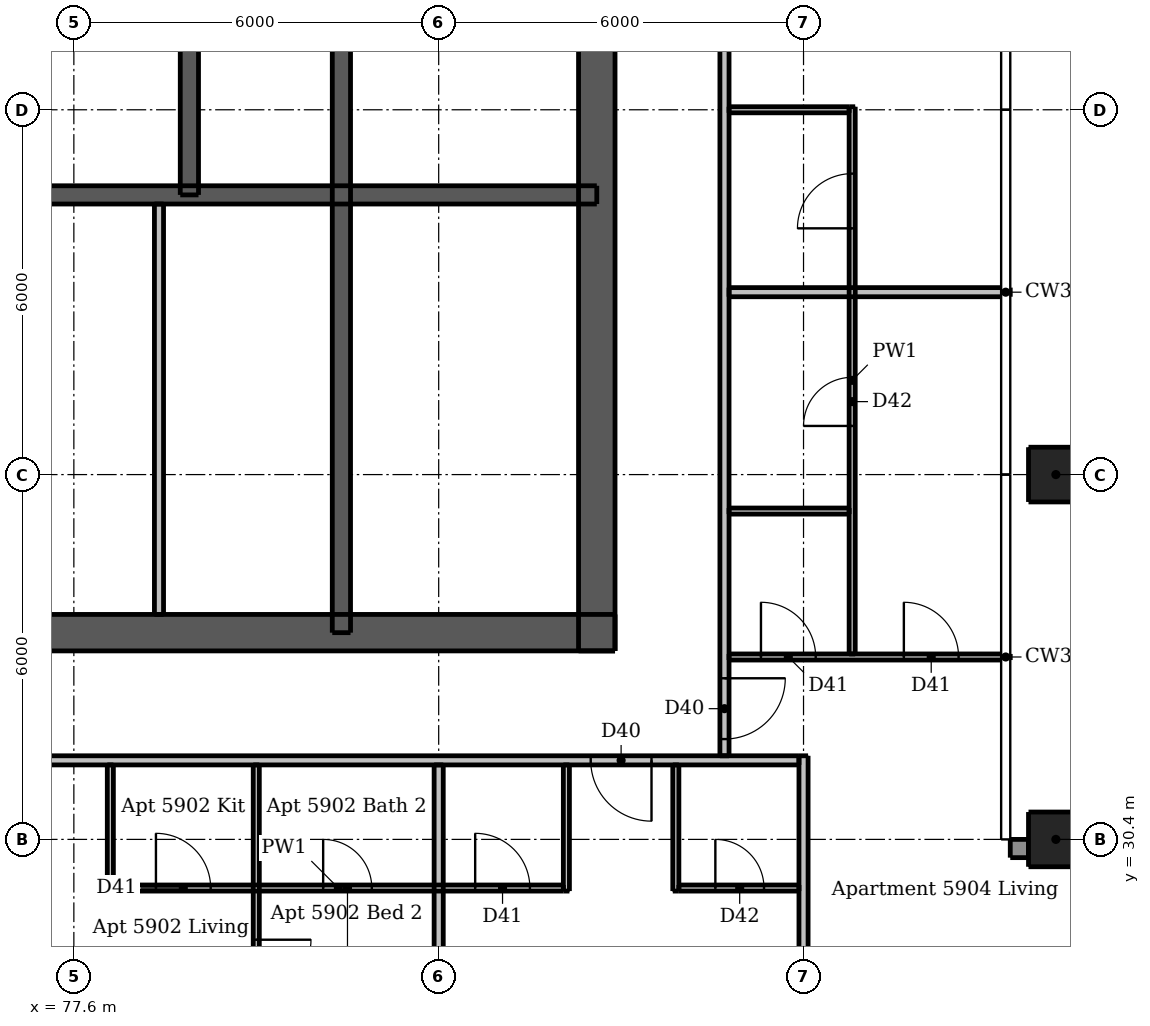
"""IFC4 building model, lengths in metres.
Left out: names, types, materials, properties, quantities, classifications, styles, units other than length and angle.
Written with IfcOpenShell. Run it as: python <this file> out.ifc"""

import sys

from ifc_helpers import new_model, si_unit, direction, frame, frame_2d, origin, origin_2d, place, context, subcontext, project, spatial, rectangle, extrude, element, fill, save


model = new_model("IFC4")
c1 = context("Model", 3, precision=1e-05, world=origin(), true_north=direction((0.0, 1.0)))
c2 = subcontext(c1, "Body", "Model", "MODEL_VIEW")
j1 = project(units=[si_unit("LENGTHUNIT", "METRE"), si_unit("PLANEANGLEUNIT", "RADIAN")], contexts=[c1])
p1 = place(None, origin())
s1 = spatial("IfcSite", under=j1, at=p1, CompositionType="ELEMENT")
p2 = place(p1, origin())
s2 = spatial("IfcBuilding", under=s1, at=p2, CompositionType="ELEMENT")
p3 = place(p2, frame((0.0, 0.0, 220.0)))
s3 = spatial("IfcBuildingStorey", under=s2, at=p3, CompositionType="ELEMENT", Elevation=220.0)
p4 = place(p3, frame((62.5, 33.8, 0.0), z_axis=(0.0, 0.0, 1.0), x_axis=(1.0, 0.0, 0.0)))
e1 = element("IfcWall", 1, at=p4, inside=s3, PredefinedType="SHEAR", context=c2, shape_type="SweptSolid", body=[
    extrude(rectangle(XDim=24.0, YDim=0.6, at=frame_2d((12.0, 0.0))), origin(), (0.0, 0.0, 1.0), 3.05),
])
p5 = place(p4, frame((1.925, 0.0, 0.0)))
e2 = element("IfcOpeningElement", 2, at=p5, cuts=e1, PredefinedType="OPENING", context=c2, shape_type="SweptSolid", body=[
    extrude(rectangle(XDim=1.1, YDim=2.1, at=frame_2d((0.55, 1.05))), frame((0.0, 0.31, 0.0), z_axis=(0.0, -1.0, 0.0), x_axis=(1.0, 0.0, 0.0)), (0.0, 0.0, 1.0), 0.62),
])
p6 = place(p4, frame((20.975, 0.0, 0.0)))
e3 = element("IfcOpeningElement", 3, at=p6, cuts=e1, PredefinedType="OPENING", context=c2, shape_type="SweptSolid", body=[
    extrude(rectangle(XDim=1.1, YDim=2.1, at=frame_2d((0.55, 1.05))), frame((0.0, 0.31, 0.0), z_axis=(0.0, -1.0, 0.0), x_axis=(1.0, 0.0, 0.0)), (0.0, 0.0, 1.0), 0.62),
])
p7 = place(p4, frame((8.0, 0.0, 0.0)))
e4 = element("IfcOpeningElement", 4, at=p7, cuts=e1, PredefinedType="OPENING", context=c2, shape_type="SweptSolid", body=[
    extrude(rectangle(XDim=1.1, YDim=2.1, at=frame_2d((0.55, 1.05))), frame((0.0, 0.31, 0.0), z_axis=(0.0, -1.0, 0.0), x_axis=(1.0, 0.0, 0.0)), (0.0, 0.0, 1.0), 0.62),
])
p8 = place(p4, frame((17.512, 0.0, 0.0)))
e5 = element("IfcOpeningElement", 5, at=p8, cuts=e1, PredefinedType="OPENING", context=c2, shape_type="SweptSolid", body=[
    extrude(rectangle(XDim=0.9, YDim=2.1, at=frame_2d((0.45, 1.05))), frame((0.0, 0.31, 0.0), z_axis=(0.0, -1.0, 0.0), x_axis=(1.0, 0.0, 0.0)), (0.0, 0.0, 1.0), 0.62),
])
p9 = place(p3, frame((86.2, 33.5, 0.0), z_axis=(0.0, 0.0, 1.0), x_axis=(0.0, 1.0, 0.0)))
e6 = element("IfcWall", 6, at=p9, inside=s3, PredefinedType="SHEAR", context=c2, shape_type="SweptSolid", body=[
    extrude(rectangle(XDim=24.0, YDim=0.6, at=frame_2d((12.0, 0.0))), origin(), (0.0, 0.0, 1.0), 3.05),
])
p10 = place(p9, frame((11.2, 0.0, 0.0)))
e7 = element("IfcOpeningElement", 7, at=p10, cuts=e6, PredefinedType="OPENING", context=c2, shape_type="SweptSolid", body=[
    extrude(rectangle(XDim=1.6, YDim=2.1, at=frame_2d((0.8, 1.05))), frame((0.0, 0.31, 0.0), z_axis=(0.0, -1.0, 0.0), x_axis=(1.0, 0.0, 0.0)), (0.0, 0.0, 1.0), 0.62),
])
p11 = place(p3, frame((62.8, 41.0, 0.0), z_axis=(0.0, 0.0, 1.0), x_axis=(1.0, 0.0, 0.0)))
e8 = element("IfcWall", 8, at=p11, inside=s3, PredefinedType="SHEAR", context=c2, shape_type="SweptSolid", body=[
    extrude(rectangle(XDim=23.4, YDim=0.3, at=frame_2d((11.7, 0.0))), origin(), (0.0, 0.0, 1.0), 3.05),
])
p12 = place(p3, frame((82.0, 33.8, 0.0), z_axis=(0.0, 0.0, 1.0), x_axis=(0.0, 1.0, 0.0)))
e9 = element("IfcWall", 9, at=p12, inside=s3, PredefinedType="SHEAR", context=c2, shape_type="SweptSolid", body=[
    extrude(rectangle(XDim=10.1, YDim=0.3, at=frame_2d((5.05, 0.0))), origin(), (0.0, 0.0, 1.0), 3.05),
])
p13 = place(p3, frame((79.5, 41.0, 0.0), z_axis=(0.0, 0.0, 1.0), x_axis=(0.0, 1.0, 0.0)))
e10 = element("IfcWall", 10, at=p13, inside=s3, PredefinedType="SHEAR", context=c2, shape_type="SweptSolid", body=[
    extrude(rectangle(XDim=2.9, YDim=0.3, at=frame_2d((1.45, 0.0))), origin(), (0.0, 0.0, 1.0), 3.05),
])
for number, where, z_axis, x_axis in (
    (11, (93.75, 30.4, 0.0), (0.0, 0.0, 1.0), (1.0, 0.0, 0.0)),
    (12, (93.75, 36.4, 0.0), (0.0, 0.0, 1.0), (1.0, 0.0, 0.0)),
):
    element("IfcColumn", number, at=place(p3, frame(where, z_axis=z_axis, x_axis=x_axis)), inside=s3, PredefinedType="COLUMN", context=c2, shape_type="SweptSolid", body=[
        extrude(rectangle(XDim=0.9, YDim=0.9, at=origin_2d()), origin(), (0.0, 0.0, 1.0), 3.05),
    ])
p14 = place(p3, frame((93.3, 30.25, 0.0), z_axis=(0.0, 0.0, 1.0), x_axis=(-1.0, 0.0, 0.0)))
e13 = element("IfcWall", 13, at=p14, inside=s3, PredefinedType="SOLIDWALL", context=c2, shape_type="SweptSolid", body=[
    extrude(rectangle(XDim=0.3, YDim=0.3, at=frame_2d((0.15, 0.0))), origin(), (0.0, 0.0, 1.0), 3.05),
])
p15 = place(p3, frame((79.0, 34.1, 0.0), z_axis=(0.0, 0.0, 1.0), x_axis=(0.0, 1.0, 0.0)))
e14 = element("IfcWall", 14, at=p15, inside=s3, PredefinedType="PLUMBINGWALL", context=c2, shape_type="SweptSolid", body=[
    extrude(rectangle(XDim=6.75, YDim=0.15, at=frame_2d((3.375, 0.0))), origin(), (0.0, 0.0, 1.0), 3.05),
])
p16 = place(p3, frame((78.2, 29.55, 0.0), z_axis=(0.0, 0.0, 1.0), x_axis=(0.0, 1.0, 0.0)))
e15 = element("IfcWall", 15, at=p16, inside=s3, PredefinedType="PARTITIONING", context=c2, shape_type="SweptSolid", body=[
    extrude(rectangle(XDim=2.075, YDim=0.1, at=frame_2d((1.038, 0.0))), origin(), (0.0, 0.0, 1.0), 3.05),
])
p17 = place(p3, frame((80.6, 31.625, 0.0), z_axis=(0.0, 0.0, 1.0), x_axis=(0.0, -1.0, 0.0)))
e16 = element("IfcWall", 16, at=p17, inside=s3, PredefinedType="PARTITIONING", context=c2, shape_type="SweptSolid", body=[
    extrude(rectangle(XDim=4.625, YDim=0.1, at=frame_2d((2.312, 0.0))), origin(), (0.0, 0.0, 1.0), 3.05),
])
p18 = place(p17, frame((2.875, 0.0, 0.0)))
e17 = element("IfcOpeningElement", 17, at=p18, cuts=e16, PredefinedType="OPENING", context=c2, shape_type="SweptSolid", body=[
    extrude(rectangle(XDim=0.9, YDim=2.1, at=frame_2d((0.45, 1.05))), frame((0.0, 0.06, 0.0), z_axis=(0.0, -1.0, 0.0), x_axis=(1.0, 0.0, 0.0)), (0.0, 0.0, 1.0), 0.12),
])
for number, where, z_axis, x_axis in (
    (18, (85.7, 29.55, 0.0), (0.0, 0.0, 1.0), (0.0, 1.0, 0.0)),
    (19, (87.5, 29.55, 0.0), (0.0, 0.0, 1.0), (0.0, 1.0, 0.0)),
):
    element("IfcWall", number, at=place(p3, frame(where, z_axis=z_axis, x_axis=x_axis)), inside=s3, PredefinedType="PARTITIONING", context=c2, shape_type="SweptSolid", body=[
        extrude(rectangle(XDim=2.075, YDim=0.1, at=frame_2d((1.038, 0.0))), origin(), (0.0, 0.0, 1.0), 3.05),
    ])
p19 = place(p3, frame((90.4, 33.45, 0.0), z_axis=(0.0, 0.0, 1.0), x_axis=(0.0, 1.0, 0.0)))
e20 = element("IfcWall", 20, at=p19, inside=s3, PredefinedType="PARTITIONING", context=c2, shape_type="SweptSolid", body=[
    extrude(rectangle(XDim=9.0, YDim=0.1, at=frame_2d((4.5, 0.0))), origin(), (0.0, 0.0, 1.0), 3.05),
])
p20 = place(p19, frame((3.75, 0.0, 0.0)))
e21 = element("IfcOpeningElement", 21, at=p20, cuts=e20, PredefinedType="OPENING", context=c2, shape_type="SweptSolid", body=[
    extrude(rectangle(XDim=0.8, YDim=2.1, at=frame_2d((0.4, 1.05))), frame((0.0, 0.06, 0.0), z_axis=(0.0, -1.0, 0.0), x_axis=(1.0, 0.0, 0.0)), (0.0, 0.0, 1.0), 0.12),
])
p21 = place(p19, frame((7.0, 0.0, 0.0)))
e22 = element("IfcOpeningElement", 22, at=p21, cuts=e20, PredefinedType="OPENING", context=c2, shape_type="SweptSolid", body=[
    extrude(rectangle(XDim=0.9, YDim=2.1, at=frame_2d((0.45, 1.05))), frame((0.0, 0.06, 0.0), z_axis=(0.0, -1.0, 0.0), x_axis=(1.0, 0.0, 0.0)), (0.0, 0.0, 1.0), 0.12),
])
p22 = place(p3, frame((88.375, 42.4, 0.0), z_axis=(0.0, 0.0, 1.0), x_axis=(1.0, 0.0, 0.0)))
e23 = element("IfcWall", 23, at=p22, inside=s3, PredefinedType="PARTITIONING", context=c2, shape_type="SweptSolid", body=[
    extrude(rectangle(XDim=1.975, YDim=0.1, at=frame_2d((0.988, 0.0))), origin(), (0.0, 0.0, 1.0), 2.59),
])
p23 = place(p3, frame((88.375, 35.8, 0.0), z_axis=(0.0, 0.0, 1.0), x_axis=(1.0, 0.0, 0.0)))
e24 = element("IfcWall", 24, at=p23, inside=s3, PredefinedType="PARTITIONING", context=c2, shape_type="SweptSolid", body=[
    extrude(rectangle(XDim=1.975, YDim=0.1, at=frame_2d((0.988, 0.0))), origin(), (0.0, 0.0, 1.0), 3.05),
])
p24 = place(p3, frame((88.375, 33.4, 0.0), z_axis=(0.0, 0.0, 1.0), x_axis=(1.0, 0.0, 0.0)))
e25 = element("IfcWall", 25, at=p24, inside=s3, PredefinedType="PARTITIONING", context=c2, shape_type="SweptSolid", body=[
    extrude(rectangle(XDim=4.625, YDim=0.1, at=frame_2d((2.312, 0.0))), origin(), (0.0, 0.0, 1.0), 3.05),
])
p25 = place(p24, frame((0.525, 0.0, 0.0)))
e26 = element("IfcOpeningElement", 26, at=p25, cuts=e25, PredefinedType="OPENING", context=c2, shape_type="SweptSolid", body=[
    extrude(rectangle(XDim=0.9, YDim=2.1, at=frame_2d((0.45, 1.05))), frame((0.0, 0.06, 0.0), z_axis=(0.0, -1.0, 0.0), x_axis=(1.0, 0.0, 0.0)), (0.0, 0.0, 1.0), 0.12),
])
p26 = place(p24, frame((2.875, 0.0, 0.0)))
e27 = element("IfcOpeningElement", 27, at=p26, cuts=e25, PredefinedType="OPENING", context=c2, shape_type="SweptSolid", body=[
    extrude(rectangle(XDim=0.9, YDim=2.1, at=frame_2d((0.45, 1.05))), frame((0.0, 0.06, 0.0), z_axis=(0.0, -1.0, 0.0), x_axis=(1.0, 0.0, 0.0)), (0.0, 0.0, 1.0), 0.12),
])
p27 = place(p3, frame((78.25, 29.6, 0.0), z_axis=(0.0, 0.0, 1.0), x_axis=(1.0, 0.0, 0.0)))
e28 = element("IfcWall", 28, at=p27, inside=s3, PredefinedType="PARTITIONING", context=c2, shape_type="SweptSolid", body=[
    extrude(rectangle(XDim=7.4, YDim=0.1, at=frame_2d((3.7, 0.0))), origin(), (0.0, 0.0, 1.0), 3.05),
])
p28 = place(p27, frame((0.7, 0.0, 0.0)))
e29 = element("IfcOpeningElement", 29, at=p28, cuts=e28, PredefinedType="OPENING", context=c2, shape_type="SweptSolid", body=[
    extrude(rectangle(XDim=0.9, YDim=2.1, at=frame_2d((0.45, 1.05))), frame((0.0, 0.06, 0.0), z_axis=(0.0, -1.0, 0.0), x_axis=(1.0, 0.0, 0.0)), (0.0, 0.0, 1.0), 0.12),
])
p29 = place(p27, frame((3.45, 0.0, 0.0)))
e30 = element("IfcOpeningElement", 30, at=p29, cuts=e28, PredefinedType="OPENING", context=c2, shape_type="SweptSolid", body=[
    extrude(rectangle(XDim=0.8, YDim=2.1, at=frame_2d((0.4, 1.05))), frame((0.0, 0.06, 0.0), z_axis=(0.0, -1.0, 0.0), x_axis=(1.0, 0.0, 0.0)), (0.0, 0.0, 1.0), 0.12),
])
p30 = place(p27, frame((5.95, 0.0, 0.0)))
e31 = element("IfcOpeningElement", 31, at=p30, cuts=e28, PredefinedType="OPENING", context=c2, shape_type="SweptSolid", body=[
    extrude(rectangle(XDim=0.9, YDim=2.1, at=frame_2d((0.45, 1.05))), frame((0.0, 0.06, 0.0), z_axis=(0.0, -1.0, 0.0), x_axis=(1.0, 0.0, 0.0)), (0.0, 0.0, 1.0), 0.12),
])
p31 = place(p3, frame((87.55, 29.6, 0.0), z_axis=(0.0, 0.0, 1.0), x_axis=(1.0, 0.0, 0.0)))
e32 = element("IfcWall", 32, at=p31, inside=s3, PredefinedType="PARTITIONING", context=c2, shape_type="SweptSolid", body=[
    extrude(rectangle(XDim=1.975, YDim=0.1, at=frame_2d((0.987, 0.0))), origin(), (0.0, 0.0, 1.0), 3.05),
])
p32 = place(p31, frame((0.6, 0.0, 0.0)))
e33 = element("IfcOpeningElement", 33, at=p32, cuts=e32, PredefinedType="OPENING", context=c2, shape_type="SweptSolid", body=[
    extrude(rectangle(XDim=0.8, YDim=2.1, at=frame_2d((0.4, 1.05))), frame((0.0, 0.06, 0.0), z_axis=(0.0, -1.0, 0.0), x_axis=(1.0, 0.0, 0.0)), (0.0, 0.0, 1.0), 0.12),
])
p33 = place(p3, frame((83.6, 27.0, 0.0), z_axis=(0.0, 0.0, 1.0), x_axis=(0.0, 1.0, 0.0)))
e34 = element("IfcWall", 34, at=p33, inside=s3, PredefinedType="PARTITIONING", context=c2, shape_type="SweptSolid", body=[
    extrude(rectangle(XDim=4.625, YDim=0.15, at=frame_2d((2.312, 0.0))), origin(), (0.0, 0.0, 1.0), 2.59),
])
p34 = place(p3, frame((88.3, 61.175, 0.0), z_axis=(0.0, 0.0, 1.0), x_axis=(0.0, -1.0, 0.0)))
e35 = element("IfcWall", 35, at=p34, inside=s3, PredefinedType="PARTITIONING", context=c2, shape_type="SweptSolid", body=[
    extrude(rectangle(XDim=29.4, YDim=0.15, at=frame_2d((14.7, 0.0))), origin(), (0.0, 0.0, 1.0), 3.05),
])
p35 = place(p34, frame((28.125, 0.0, 0.0)))
e36 = element("IfcOpeningElement", 36, at=p35, cuts=e35, PredefinedType="OPENING", context=c2, shape_type="SweptSolid", body=[
    extrude(rectangle(XDim=1.0, YDim=2.1, at=frame_2d((0.5, 1.05))), frame((0.0, 0.085, 0.0), z_axis=(0.0, -1.0, 0.0), x_axis=(1.0, 0.0, 0.0)), (0.0, 0.0, 1.0), 0.17),
])
p36 = place(p34, frame((15.275, 0.0, 0.0)))
e37 = element("IfcOpeningElement", 37, at=p36, cuts=e35, PredefinedType="OPENING", context=c2, shape_type="SweptSolid", body=[
    extrude(rectangle(XDim=1.0, YDim=2.1, at=frame_2d((0.5, 1.05))), frame((0.0, 0.085, 0.0), z_axis=(0.0, -1.0, 0.0), x_axis=(1.0, 0.0, 0.0)), (0.0, 0.0, 1.0), 0.17),
])
p37 = place(p34, frame((5.075, 0.0, 0.0)))
e38 = element("IfcOpeningElement", 38, at=p37, cuts=e35, PredefinedType="OPENING", context=c2, shape_type="SweptSolid", body=[
    extrude(rectangle(XDim=1.0, YDim=2.1, at=frame_2d((0.5, 1.05))), frame((0.0, 0.085, 0.0), z_axis=(0.0, -1.0, 0.0), x_axis=(1.0, 0.0, 0.0)), (0.0, 0.0, 1.0), 0.17),
])
p38 = place(p3, frame((89.6, 27.0, 0.0), z_axis=(0.0, 0.0, 1.0), x_axis=(0.0, 1.0, 0.0)))
e39 = element("IfcWall", 39, at=p38, inside=s3, PredefinedType="PARTITIONING", context=c2, shape_type="SweptSolid", body=[
    extrude(rectangle(XDim=4.775, YDim=0.15, at=frame_2d((2.387, 0.0))), origin(), (0.0, 0.0, 1.0), 2.516),
])
p39 = place(p3, frame((88.375, 39.4, 0.0), z_axis=(0.0, 0.0, 1.0), x_axis=(1.0, 0.0, 0.0)))
e40 = element("IfcWall", 40, at=p39, inside=s3, PredefinedType="PARTITIONING", context=c2, shape_type="SweptSolid", body=[
    extrude(rectangle(XDim=4.625, YDim=0.15, at=frame_2d((2.312, 0.0))), origin(), (0.0, 0.0, 1.0), 3.05),
])
p40 = place(p3, frame((89.525, 31.7, 0.0), z_axis=(0.0, 0.0, 1.0), x_axis=(-1.0, 0.0, 0.0)))
e41 = element("IfcWall", 41, at=p40, inside=s3, PredefinedType="PARTITIONING", context=c2, shape_type="SweptSolid", body=[
    extrude(rectangle(XDim=30.55, YDim=0.15, at=frame_2d((15.275, 0.0))), origin(), (0.0, 0.0, 1.0), 3.05),
])
p41 = place(p40, frame((28.275, 0.0, 0.0)))
e42 = element("IfcOpeningElement", 42, at=p41, cuts=e41, PredefinedType="OPENING", context=c2, shape_type="SweptSolid", body=[
    extrude(rectangle(XDim=1.0, YDim=2.1, at=frame_2d((0.5, 1.05))), frame((0.0, 0.085, 0.0), z_axis=(0.0, -1.0, 0.0), x_axis=(1.0, 0.0, 0.0)), (0.0, 0.0, 1.0), 0.17),
])
p42 = place(p40, frame((12.625, 0.0, 0.0)))
e43 = element("IfcOpeningElement", 43, at=p42, cuts=e41, PredefinedType="OPENING", context=c2, shape_type="SweptSolid", body=[
    extrude(rectangle(XDim=1.0, YDim=2.1, at=frame_2d((0.5, 1.05))), frame((0.0, 0.085, 0.0), z_axis=(0.0, -1.0, 0.0), x_axis=(1.0, 0.0, 0.0)), (0.0, 0.0, 1.0), 0.17),
])
p43 = place(p40, frame((2.425, 0.0, 0.0)))
e44 = element("IfcOpeningElement", 44, at=p43, cuts=e41, PredefinedType="OPENING", context=c2, shape_type="SweptSolid", body=[
    extrude(rectangle(XDim=1.0, YDim=2.1, at=frame_2d((0.5, 1.05))), frame((0.0, 0.085, 0.0), z_axis=(0.0, -1.0, 0.0), x_axis=(1.0, 0.0, 0.0)), (0.0, 0.0, 1.0), 0.17),
])
p44 = place(p6, origin())
e45 = element("IfcDoor", 45, at=p44, inside=s3, OperationType="SINGLE_SWING_RIGHT", PredefinedType="DOOR", context=c2, shape_type="SweptSolid", body=[
    extrude(rectangle(XDim=1.1, YDim=2.1, at=frame_2d((0.55, 1.05))), frame((0.0, 0.288, 0.0), z_axis=(0.0, -1.0, 0.0), x_axis=(1.0, 0.0, 0.0)), (0.0, 0.0, 1.0), 0.05),
])
fill(e3, e45)
p45 = place(p8, origin())
e46 = element("IfcDoor", 46, at=p45, inside=s3, OperationType="SINGLE_SWING_LEFT", PredefinedType="DOOR", context=c2, shape_type="SweptSolid", body=[
    extrude(rectangle(XDim=0.9, YDim=2.1, at=frame_2d((0.45, 1.05))), frame((0.0, 0.288, 0.0), z_axis=(0.0, -1.0, 0.0), x_axis=(1.0, 0.0, 0.0)), (0.0, 0.0, 1.0), 0.05),
])
fill(e5, e46)
p46 = place(p28, origin())
e47 = element("IfcDoor", 47, at=p46, inside=s3, OperationType="SINGLE_SWING_LEFT", PredefinedType="DOOR", context=c2, shape_type="SweptSolid", body=[
    extrude(rectangle(XDim=0.9, YDim=2.1, at=frame_2d((0.45, 1.05))), frame((0.0, 0.025, 0.0), z_axis=(0.0, -1.0, 0.0), x_axis=(1.0, 0.0, 0.0)), (0.0, 0.0, 1.0), 0.05),
])
fill(e29, e47)
p47 = place(p18, origin())
e48 = element("IfcDoor", 48, at=p47, inside=s3, OperationType="SINGLE_SWING_LEFT", PredefinedType="DOOR", context=c2, shape_type="SweptSolid", body=[
    extrude(rectangle(XDim=0.9, YDim=2.1, at=frame_2d((0.45, 1.05))), frame((0.0, 0.025, 0.0), z_axis=(0.0, -1.0, 0.0), x_axis=(1.0, 0.0, 0.0)), (0.0, 0.0, 1.0), 0.05),
])
fill(e17, e48)
p48 = place(p29, origin())
e49 = element("IfcDoor", 49, at=p48, inside=s3, OperationType="SINGLE_SWING_LEFT", PredefinedType="DOOR", context=c2, shape_type="SweptSolid", body=[
    extrude(rectangle(XDim=0.8, YDim=2.1, at=frame_2d((0.4, 1.05))), frame((0.0, 0.025, 0.0), z_axis=(0.0, -1.0, 0.0), x_axis=(1.0, 0.0, 0.0)), (0.0, 0.0, 1.0), 0.05),
])
fill(e30, e49)
p49 = place(p43, origin())
e50 = element("IfcDoor", 50, at=p49, inside=s3, OperationType="SINGLE_SWING_LEFT", PredefinedType="DOOR", context=c2, shape_type="SweptSolid", body=[
    extrude(rectangle(XDim=1.0, YDim=2.1, at=frame_2d((0.5, 1.05))), frame((0.0, 0.025, 0.0), z_axis=(0.0, -1.0, 0.0), x_axis=(1.0, 0.0, 0.0)), (0.0, 0.0, 1.0), 0.05),
])
fill(e44, e50)
p50 = place(p30, origin())
e51 = element("IfcDoor", 51, at=p50, inside=s3, OperationType="SINGLE_SWING_LEFT", PredefinedType="DOOR", context=c2, shape_type="SweptSolid", body=[
    extrude(rectangle(XDim=0.9, YDim=2.1, at=frame_2d((0.45, 1.05))), frame((0.0, 0.025, 0.0), z_axis=(0.0, -1.0, 0.0), x_axis=(1.0, 0.0, 0.0)), (0.0, 0.0, 1.0), 0.05),
])
fill(e31, e51)
p51 = place(p32, origin())
e52 = element("IfcDoor", 52, at=p51, inside=s3, OperationType="SINGLE_SWING_LEFT", PredefinedType="DOOR", context=c2, shape_type="SweptSolid", body=[
    extrude(rectangle(XDim=0.8, YDim=2.1, at=frame_2d((0.4, 1.05))), frame((0.0, 0.025, 0.0), z_axis=(0.0, -1.0, 0.0), x_axis=(1.0, 0.0, 0.0)), (0.0, 0.0, 1.0), 0.05),
])
fill(e33, e52)
p52 = place(p35, origin())
e53 = element("IfcDoor", 53, at=p52, inside=s3, OperationType="SINGLE_SWING_LEFT", PredefinedType="DOOR", context=c2, shape_type="SweptSolid", body=[
    extrude(rectangle(XDim=1.0, YDim=2.1, at=frame_2d((0.5, 1.05))), frame((0.0, 0.025, 0.0), z_axis=(0.0, -1.0, 0.0), x_axis=(1.0, 0.0, 0.0)), (0.0, 0.0, 1.0), 0.05),
])
fill(e36, e53)
p53 = place(p25, origin())
e54 = element("IfcDoor", 54, at=p53, inside=s3, OperationType="SINGLE_SWING_LEFT", PredefinedType="DOOR", context=c2, shape_type="SweptSolid", body=[
    extrude(rectangle(XDim=0.9, YDim=2.1, at=frame_2d((0.45, 1.05))), frame((0.0, 0.025, 0.0), z_axis=(0.0, -1.0, 0.0), x_axis=(1.0, 0.0, 0.0)), (0.0, 0.0, 1.0), 0.05),
])
fill(e26, e54)
p54 = place(p26, origin())
e55 = element("IfcDoor", 55, at=p54, inside=s3, OperationType="SINGLE_SWING_LEFT", PredefinedType="DOOR", context=c2, shape_type="SweptSolid", body=[
    extrude(rectangle(XDim=0.9, YDim=2.1, at=frame_2d((0.45, 1.05))), frame((0.0, 0.025, 0.0), z_axis=(0.0, -1.0, 0.0), x_axis=(1.0, 0.0, 0.0)), (0.0, 0.0, 1.0), 0.05),
])
fill(e27, e55)
p55 = place(p20, origin())
e56 = element("IfcDoor", 56, at=p55, inside=s3, OperationType="SINGLE_SWING_LEFT", PredefinedType="DOOR", context=c2, shape_type="SweptSolid", body=[
    extrude(rectangle(XDim=0.8, YDim=2.1, at=frame_2d((0.4, 1.05))), frame((0.0, 0.025, 0.0), z_axis=(0.0, -1.0, 0.0), x_axis=(1.0, 0.0, 0.0)), (0.0, 0.0, 1.0), 0.05),
])
fill(e21, e56)
p56 = place(p21, origin())
e57 = element("IfcDoor", 57, at=p56, inside=s3, OperationType="SINGLE_SWING_LEFT", PredefinedType="DOOR", context=c2, shape_type="SweptSolid", body=[
    extrude(rectangle(XDim=0.9, YDim=2.1, at=frame_2d((0.45, 1.05))), frame((0.0, 0.025, 0.0), z_axis=(0.0, -1.0, 0.0), x_axis=(1.0, 0.0, 0.0)), (0.0, 0.0, 1.0), 0.05),
])
fill(e22, e57)
save(model, sys.argv[1])
